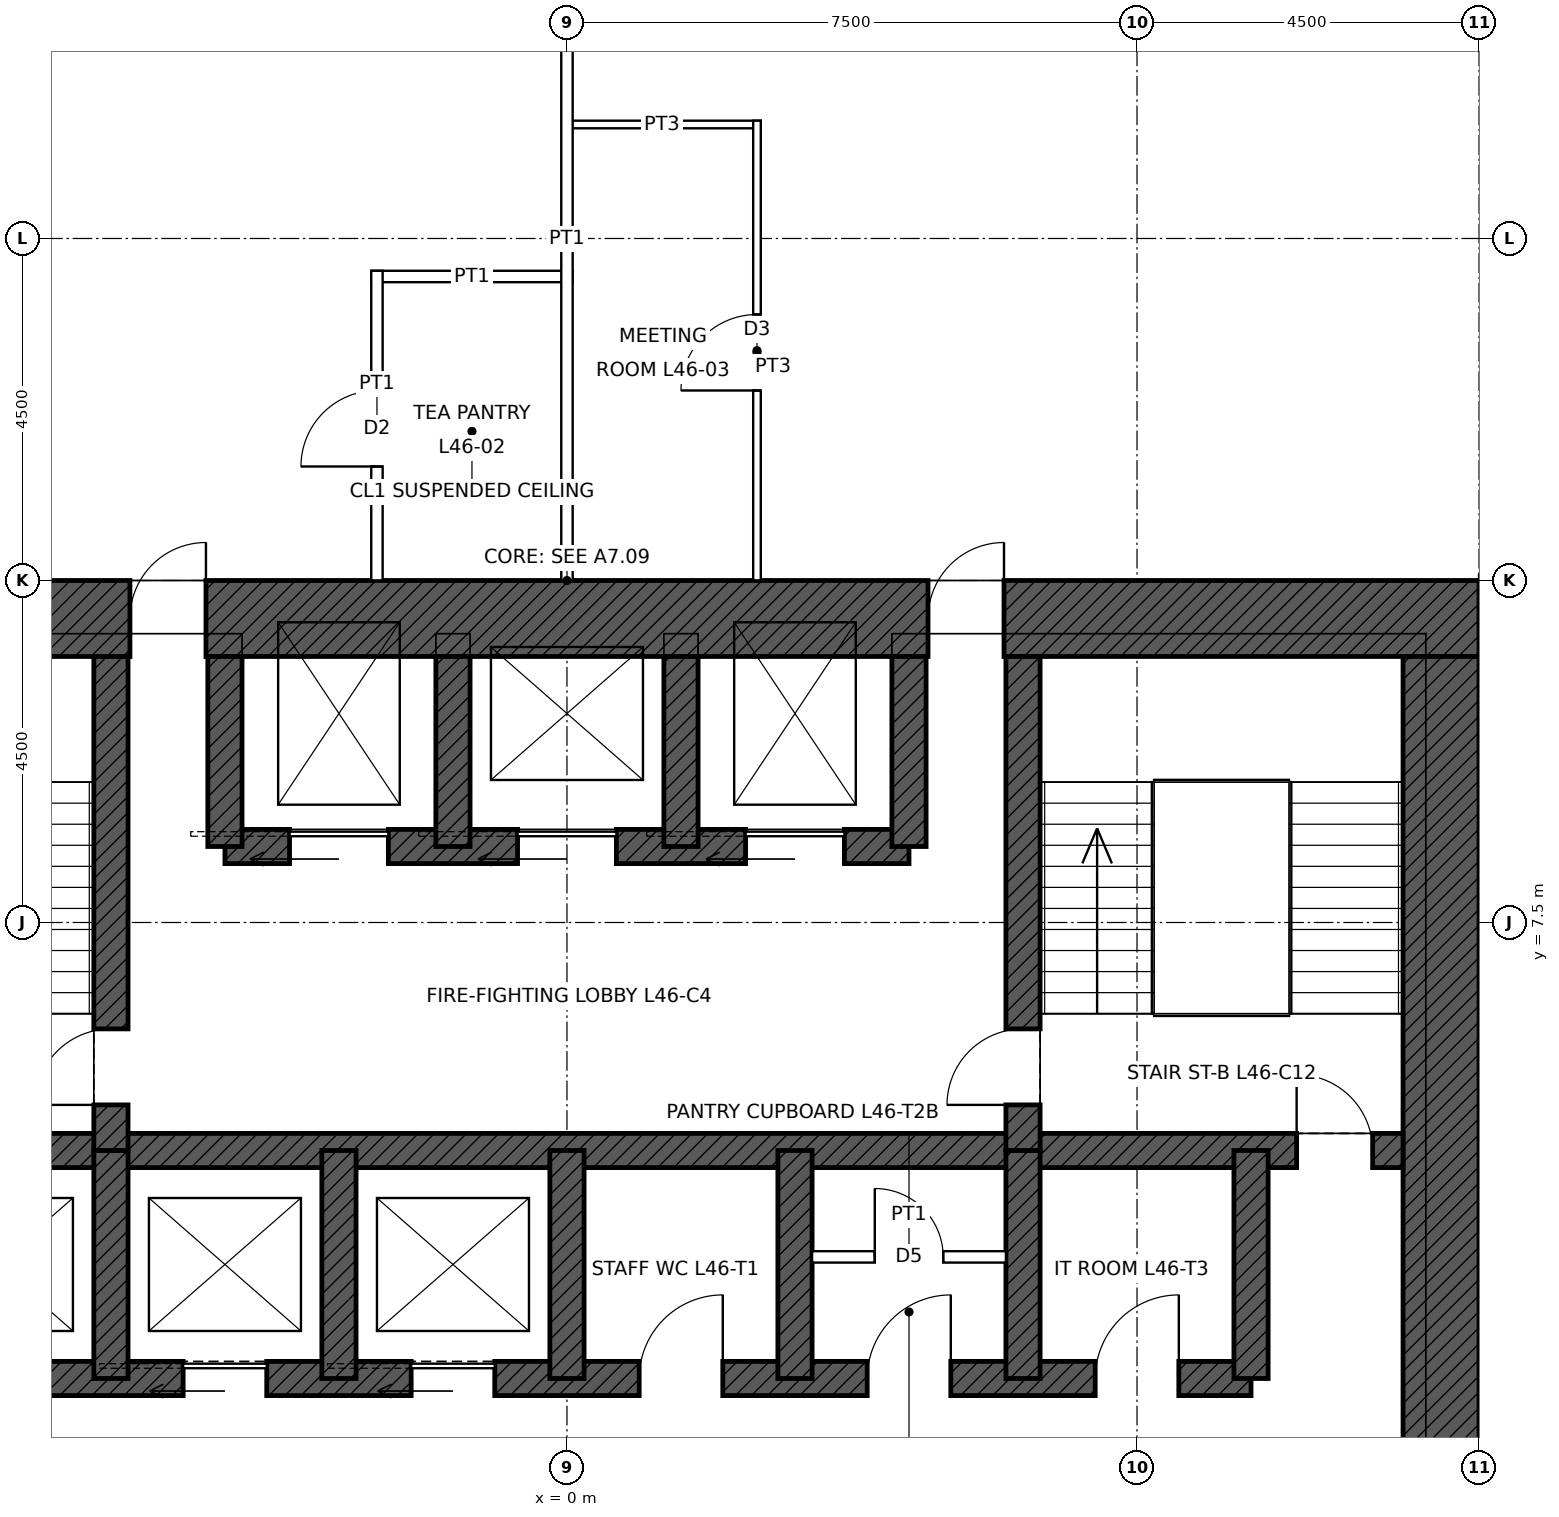
"""IFC4 building model, lengths in metres.
Left out: names, types, materials, properties, quantities, classifications, styles, units other than length and angle.
Written with IfcOpenShell. Run it as: python <this file> out.ifc"""

import sys

from ifc_helpers import new_model, si_unit, direction, frame, frame_2d, origin, place, context, subcontext, project, spatial, rectangle, extrude, element, fill, save


model = new_model("IFC4")
c1 = context("Model", 3, precision=1e-05, world=origin(), true_north=direction((0.0, 1.0)))
c2 = subcontext(c1, "Body", "Model", "MODEL_VIEW")
j1 = project(units=[si_unit("LENGTHUNIT", "METRE"), si_unit("PLANEANGLEUNIT", "RADIAN")], contexts=[c1])
p1 = place(None, origin())
s1 = spatial("IfcSite", under=j1, at=p1, CompositionType="ELEMENT")
p2 = place(p1, origin())
s2 = spatial("IfcBuilding", under=s1, at=p2, CompositionType="ELEMENT")
p3 = place(p2, frame((0.0, 0.0, 217.9)))
s3 = spatial("IfcBuildingStorey", under=s2, at=p3, CompositionType="ELEMENT", Elevation=217.9)
p4 = place(p3, frame((-12.0, 11.5, 0.0), z_axis=(0.0, 0.0, 1.0), x_axis=(1.0, 0.0, 0.0)))
e1 = element("IfcWall", 1, at=p4, inside=s3, PredefinedType="SHEAR", context=c2, shape_type="SweptSolid", body=[
    extrude(rectangle(XDim=24.0, YDim=1.0, at=frame_2d((12.0, 0.0))), origin(), (0.0, 0.0, 1.0), 4.0),
])
p5 = place(p4, frame((6.25, 0.0, 0.0)))
e2 = element("IfcOpeningElement", 2, at=p5, cuts=e1, PredefinedType="OPENING", context=c2, shape_type="SweptSolid", body=[
    extrude(rectangle(XDim=1.0, YDim=2.4, at=frame_2d((0.5, 1.2))), frame((0.0, 0.51, 0.0), z_axis=(0.0, -1.0, 0.0), x_axis=(1.0, 0.0, 0.0)), (0.0, 0.0, 1.0), 1.02),
])
p6 = place(p4, frame((16.75, 0.0, 0.0)))
e3 = element("IfcOpeningElement", 3, at=p6, cuts=e1, PredefinedType="OPENING", context=c2, shape_type="SweptSolid", body=[
    extrude(rectangle(XDim=1.0, YDim=2.4, at=frame_2d((0.5, 1.2))), frame((0.0, 0.51, 0.0), z_axis=(0.0, -1.0, 0.0), x_axis=(1.0, 0.0, 0.0)), (0.0, 0.0, 1.0), 1.02),
])
p7 = place(p3, frame((11.5, 11.0, 0.0), z_axis=(0.0, 0.0, 1.0), x_axis=(0.0, -1.0, 0.0)))
e4 = element("IfcWall", 4, at=p7, inside=s3, PredefinedType="SHEAR", context=c2, shape_type="SweptSolid", body=[
    extrude(rectangle(XDim=22.0, YDim=1.0, at=frame_2d((11.0, 0.0))), origin(), (0.0, 0.0, 1.0), 4.0),
])
p8 = place(p7, frame((10.5, 0.0, 0.0)))
e5 = element("IfcOpeningElement", 5, at=p8, cuts=e4, PredefinedType="OPENING", context=c2, shape_type="SweptSolid", body=[
    extrude(rectangle(XDim=1.0, YDim=2.4, at=frame_2d((0.5, 1.2))), frame((0.0, 0.51, 0.0), z_axis=(0.0, -1.0, 0.0), x_axis=(1.0, 0.0, 0.0)), (0.0, 0.0, 1.0), 1.02),
])
p9 = place(p3, frame((-11.0, 4.5, 0.0), z_axis=(0.0, 0.0, 1.0), x_axis=(1.0, 0.0, 0.0)))
e6 = element("IfcWall", 6, at=p9, inside=s3, PredefinedType="SHEAR", context=c2, shape_type="SweptSolid", body=[
    extrude(rectangle(XDim=22.0, YDim=0.45, at=frame_2d((11.0, 0.0))), origin(), (0.0, 0.0, 1.0), 4.0),
])
p10 = place(p9, frame((0.4, 0.0, 0.0)))
e7 = element("IfcOpeningElement", 7, at=p10, cuts=e6, PredefinedType="OPENING", context=c2, shape_type="SweptSolid", body=[
    extrude(rectangle(XDim=1.0, YDim=2.1, at=frame_2d((0.5, 1.05))), frame((0.0, 0.235, 0.0), z_axis=(0.0, -1.0, 0.0), x_axis=(1.0, 0.0, 0.0)), (0.0, 0.0, 1.0), 0.47),
])
p11 = place(p9, frame((20.6, 0.0, 0.0)))
e8 = element("IfcOpeningElement", 8, at=p11, cuts=e6, PredefinedType="OPENING", context=c2, shape_type="SweptSolid", body=[
    extrude(rectangle(XDim=1.0, YDim=2.1, at=frame_2d((0.5, 1.05))), frame((0.0, 0.235, 0.0), z_axis=(0.0, -1.0, 0.0), x_axis=(1.0, 0.0, 0.0)), (0.0, 0.0, 1.0), 0.47),
])
p12 = place(p3, frame((-9.0, 1.5, 0.0), z_axis=(0.0, 0.0, 1.0), x_axis=(1.0, 0.0, 0.0)))
e9 = element("IfcWall", 9, at=p12, inside=s3, PredefinedType="SHEAR", context=c2, shape_type="SweptSolid", body=[
    extrude(rectangle(XDim=18.0, YDim=0.45, at=frame_2d((9.0, 0.0))), origin(), (0.0, 0.0, 1.0), 4.0),
])
p13 = place(p12, frame((0.95, 0.0, 0.0)))
e10 = element("IfcOpeningElement", 10, at=p13, cuts=e9, PredefinedType="OPENING", context=c2, shape_type="SweptSolid", body=[
    extrude(rectangle(XDim=1.1, YDim=2.1, at=frame_2d((0.55, 1.05))), frame((0.0, 0.235, 0.0), z_axis=(0.0, -1.0, 0.0), x_axis=(1.0, 0.0, 0.0)), (0.0, 0.0, 1.0), 0.47),
])
p14 = place(p12, frame((3.95, 0.0, 0.0)))
e11 = element("IfcOpeningElement", 11, at=p14, cuts=e9, PredefinedType="OPENING", context=c2, shape_type="SweptSolid", body=[
    extrude(rectangle(XDim=1.1, YDim=2.1, at=frame_2d((0.55, 1.05))), frame((0.0, 0.235, 0.0), z_axis=(0.0, -1.0, 0.0), x_axis=(1.0, 0.0, 0.0)), (0.0, 0.0, 1.0), 0.47),
])
p15 = place(p12, frame((6.95, 0.0, 0.0)))
e12 = element("IfcOpeningElement", 12, at=p15, cuts=e9, PredefinedType="OPENING", context=c2, shape_type="SweptSolid", body=[
    extrude(rectangle(XDim=1.1, YDim=2.1, at=frame_2d((0.55, 1.05))), frame((0.0, 0.235, 0.0), z_axis=(0.0, -1.0, 0.0), x_axis=(1.0, 0.0, 0.0)), (0.0, 0.0, 1.0), 0.47),
])
p16 = place(p12, frame((9.95, 0.0, 0.0)))
e13 = element("IfcOpeningElement", 13, at=p16, cuts=e9, PredefinedType="OPENING", context=c2, shape_type="SweptSolid", body=[
    extrude(rectangle(XDim=1.1, YDim=2.1, at=frame_2d((0.55, 1.05))), frame((0.0, 0.235, 0.0), z_axis=(0.0, -1.0, 0.0), x_axis=(1.0, 0.0, 0.0)), (0.0, 0.0, 1.0), 0.47),
])
p17 = place(p12, frame((12.95, 0.0, 0.0)))
e14 = element("IfcOpeningElement", 14, at=p17, cuts=e9, PredefinedType="OPENING", context=c2, shape_type="SweptSolid", body=[
    extrude(rectangle(XDim=1.1, YDim=2.1, at=frame_2d((0.55, 1.05))), frame((0.0, 0.235, 0.0), z_axis=(0.0, -1.0, 0.0), x_axis=(1.0, 0.0, 0.0)), (0.0, 0.0, 1.0), 0.47),
])
p18 = place(p12, frame((15.95, 0.0, 0.0)))
e15 = element("IfcOpeningElement", 15, at=p18, cuts=e9, PredefinedType="OPENING", context=c2, shape_type="SweptSolid", body=[
    extrude(rectangle(XDim=1.1, YDim=2.1, at=frame_2d((0.55, 1.05))), frame((0.0, 0.235, 0.0), z_axis=(0.0, -1.0, 0.0), x_axis=(1.0, 0.0, 0.0)), (0.0, 0.0, 1.0), 0.47),
])
p19 = place(p3, frame((-4.5, 8.5, 0.0), z_axis=(0.0, 0.0, 1.0), x_axis=(1.0, 0.0, 0.0)))
e16 = element("IfcWall", 16, at=p19, inside=s3, PredefinedType="SHEAR", context=c2, shape_type="SweptSolid", body=[
    extrude(rectangle(XDim=9.0, YDim=0.45, at=frame_2d((4.5, 0.0))), origin(), (0.0, 0.0, 1.0), 4.0),
])
p20 = place(p19, frame((0.85, 0.0, 0.0)))
e17 = element("IfcOpeningElement", 17, at=p20, cuts=e16, PredefinedType="OPENING", context=c2, shape_type="SweptSolid", body=[
    extrude(rectangle(XDim=1.3, YDim=2.4, at=frame_2d((0.65, 1.2))), frame((0.0, 0.235, 0.0), z_axis=(0.0, -1.0, 0.0), x_axis=(1.0, 0.0, 0.0)), (0.0, 0.0, 1.0), 0.47),
])
p21 = place(p19, frame((6.85, 0.0, 0.0)))
e18 = element("IfcOpeningElement", 18, at=p21, cuts=e16, PredefinedType="OPENING", context=c2, shape_type="SweptSolid", body=[
    extrude(rectangle(XDim=1.3, YDim=2.4, at=frame_2d((0.65, 1.2))), frame((0.0, 0.235, 0.0), z_axis=(0.0, -1.0, 0.0), x_axis=(1.0, 0.0, 0.0)), (0.0, 0.0, 1.0), 0.47),
])
p22 = place(p19, frame((3.85, 0.0, 0.0)))
e19 = element("IfcOpeningElement", 19, at=p22, cuts=e16, PredefinedType="OPENING", context=c2, shape_type="SweptSolid", body=[
    extrude(rectangle(XDim=1.3, YDim=2.4, at=frame_2d((0.65, 1.2))), frame((0.0, 0.235, 0.0), z_axis=(0.0, -1.0, 0.0), x_axis=(1.0, 0.0, 0.0)), (0.0, 0.0, 1.0), 0.47),
])
for number, where, z_axis, x_axis in (
    (20, (9.0, 1.5, 0.0), (0.0, 0.0, 1.0), (0.0, 1.0, 0.0)),
    (21, (-6.0, 1.5, 0.0), (0.0, 0.0, 1.0), (0.0, 1.0, 0.0)),
    (22, (-3.0, 1.5, 0.0), (0.0, 0.0, 1.0), (0.0, 1.0, 0.0)),
    (23, (0.0, 1.5, 0.0), (0.0, 0.0, 1.0), (0.0, 1.0, 0.0)),
    (24, (3.0, 1.5, 0.0), (0.0, 0.0, 1.0), (0.0, 1.0, 0.0)),
    (25, (6.0, 1.5, 0.0), (0.0, 0.0, 1.0), (0.0, 1.0, 0.0)),
):
    element("IfcWall", number, at=place(p3, frame(where, z_axis=z_axis, x_axis=x_axis)), inside=s3, PredefinedType="SHEAR", context=c2, shape_type="SweptSolid", body=[
        extrude(rectangle(XDim=3.0, YDim=0.45, at=frame_2d((1.5, 0.0))), origin(), (0.0, 0.0, 1.0), 4.0),
    ])
p23 = place(p3, frame((-6.0, 4.5, 0.0), z_axis=(0.0, 0.0, 1.0), x_axis=(0.0, 1.0, 0.0)))
e26 = element("IfcWall", 26, at=p23, inside=s3, PredefinedType="SHEAR", context=c2, shape_type="SweptSolid", body=[
    extrude(rectangle(XDim=6.5, YDim=0.45, at=frame_2d((3.25, 0.0))), origin(), (0.0, 0.0, 1.0), 4.0),
])
p24 = place(p23, frame((0.6, 0.0, 0.0)))
e27 = element("IfcOpeningElement", 27, at=p24, cuts=e26, PredefinedType="OPENING", context=c2, shape_type="SweptSolid", body=[
    extrude(rectangle(XDim=1.0, YDim=2.1, at=frame_2d((0.5, 1.05))), frame((0.0, 0.235, 0.0), z_axis=(0.0, -1.0, 0.0), x_axis=(1.0, 0.0, 0.0)), (0.0, 0.0, 1.0), 0.47),
])
p25 = place(p3, frame((6.0, 4.5, 0.0), z_axis=(0.0, 0.0, 1.0), x_axis=(0.0, 1.0, 0.0)))
e28 = element("IfcWall", 28, at=p25, inside=s3, PredefinedType="SHEAR", context=c2, shape_type="SweptSolid", body=[
    extrude(rectangle(XDim=6.5, YDim=0.45, at=frame_2d((3.25, 0.0))), origin(), (0.0, 0.0, 1.0), 4.0),
])
p26 = place(p25, frame((0.6, 0.0, 0.0)))
e29 = element("IfcOpeningElement", 29, at=p26, cuts=e28, PredefinedType="OPENING", context=c2, shape_type="SweptSolid", body=[
    extrude(rectangle(XDim=1.0, YDim=2.1, at=frame_2d((0.5, 1.05))), frame((0.0, 0.235, 0.0), z_axis=(0.0, -1.0, 0.0), x_axis=(1.0, 0.0, 0.0)), (0.0, 0.0, 1.0), 0.47),
])
for number, where, z_axis, x_axis in (
    (30, (-4.5, 8.5, 0.0), (0.0, 0.0, 1.0), (0.0, 1.0, 0.0)),
    (31, (4.5, 8.5, 0.0), (0.0, 0.0, 1.0), (0.0, 1.0, 0.0)),
    (32, (-1.5, 8.5, 0.0), (0.0, 0.0, 1.0), (0.0, 1.0, 0.0)),
    (33, (1.5, 8.5, 0.0), (0.0, 0.0, 1.0), (0.0, 1.0, 0.0)),
):
    element("IfcWall", number, at=place(p3, frame(where, z_axis=z_axis, x_axis=x_axis)), inside=s3, PredefinedType="SHEAR", context=c2, shape_type="SweptSolid", body=[
        extrude(rectangle(XDim=2.5, YDim=0.45, at=frame_2d((1.25, 0.0))), origin(), (0.0, 0.0, 1.0), 4.0),
    ])
p27 = place(p3, frame((-2.575, 16.0, 0.0), z_axis=(0.0, 0.0, 1.0), x_axis=(1.0, 0.0, 0.0)))
e34 = element("IfcWall", 34, at=p27, inside=s3, PredefinedType="PARTITIONING", context=c2, shape_type="SweptSolid", body=[
    extrude(rectangle(XDim=2.65, YDim=0.15, at=frame_2d((1.325, 0.0))), origin(), (0.0, 0.0, 1.0), 3.85),
])
p28 = place(p3, frame((-0.05, 18.0, 0.0), z_axis=(0.0, 0.0, 1.0), x_axis=(1.0, 0.0, 0.0)))
e35 = element("IfcWall", 35, at=p28, inside=s3, PredefinedType="PARTITIONING", context=c2, shape_type="SweptSolid", body=[
    extrude(rectangle(XDim=2.6, YDim=0.1, at=frame_2d((1.3, 0.0))), origin(), (0.0, 0.0, 1.0), 3.85),
])
p29 = place(p3, frame((-2.5, 12.0, 0.0), z_axis=(0.0, 0.0, 1.0), x_axis=(0.0, 1.0, 0.0)))
e36 = element("IfcWall", 36, at=p29, inside=s3, PredefinedType="PARTITIONING", context=c2, shape_type="SweptSolid", body=[
    extrude(rectangle(XDim=4.075, YDim=0.15, at=frame_2d((2.038, 0.0))), origin(), (0.0, 0.0, 1.0), 3.85),
])
p30 = place(p29, frame((1.5, 0.0, 0.0)))
e37 = element("IfcOpeningElement", 37, at=p30, cuts=e36, PredefinedType="OPENING", context=c2, shape_type="SweptSolid", body=[
    extrude(rectangle(XDim=1.0, YDim=2.1, at=frame_2d((0.5, 1.05))), frame((0.0, 0.085, 0.0), z_axis=(0.0, -1.0, 0.0), x_axis=(1.0, 0.0, 0.0)), (0.0, 0.0, 1.0), 0.17),
])
p31 = place(p3, frame((0.0, 12.0, 0.0), z_axis=(0.0, 0.0, 1.0), x_axis=(0.0, 1.0, 0.0)))
e38 = element("IfcWall", 38, at=p31, inside=s3, PredefinedType="PARTITIONING", context=c2, shape_type="SweptSolid", body=[
    extrude(rectangle(XDim=8.99, YDim=0.15, at=frame_2d((4.495, 0.0))), origin(), (0.0, 0.0, 1.0), 3.238),
])
p32 = place(p3, frame((2.5, 12.0, 0.0), z_axis=(0.0, 0.0, 1.0), x_axis=(0.0, 1.0, 0.0)))
e39 = element("IfcWall", 39, at=p32, inside=s3, PredefinedType="PARTITIONING", context=c2, shape_type="SweptSolid", body=[
    extrude(rectangle(XDim=6.05, YDim=0.1, at=frame_2d((3.025, 0.0))), origin(), (0.0, 0.0, 1.0), 3.85),
])
p33 = place(p32, frame((2.5, 0.0, 0.0)))
e40 = element("IfcOpeningElement", 40, at=p33, cuts=e39, PredefinedType="OPENING", context=c2, shape_type="SweptSolid", body=[
    extrude(rectangle(XDim=1.0, YDim=2.1, at=frame_2d((0.5, 1.05))), frame((0.0, 0.06, 0.0), z_axis=(0.0, -1.0, 0.0), x_axis=(1.0, 0.0, 0.0)), (0.0, 0.0, 1.0), 0.12),
])
p34 = place(p3, frame((3.225, 3.1, 0.0), z_axis=(0.0, 0.0, 1.0), x_axis=(1.0, 0.0, 0.0)))
e41 = element("IfcWall", 41, at=p34, inside=s3, PredefinedType="PARTITIONING", context=c2, shape_type="SweptSolid", body=[
    extrude(rectangle(XDim=2.55, YDim=0.15, at=frame_2d((1.275, 0.0))), origin(), (0.0, 0.0, 1.0), 3.75),
])
p35 = place(p34, frame((0.825, 0.0, 0.0)))
e42 = element("IfcOpeningElement", 42, at=p35, cuts=e41, PredefinedType="OPENING", context=c2, shape_type="SweptSolid", body=[
    extrude(rectangle(XDim=0.9, YDim=2.1, at=frame_2d((0.45, 1.05))), frame((0.0, 0.085, 0.0), z_axis=(0.0, -1.0, 0.0), x_axis=(1.0, 0.0, 0.0)), (0.0, 0.0, 1.0), 0.17),
])
p36 = place(p11, origin())
e43 = element("IfcDoor", 43, at=p36, inside=s3, OperationType="SINGLE_SWING_LEFT", PredefinedType="DOOR", context=c2, shape_type="SweptSolid", body=[
    extrude(rectangle(XDim=1.0, YDim=2.1, at=frame_2d((0.5, 1.05))), frame((0.0, 0.025, 0.0), z_axis=(0.0, -1.0, 0.0), x_axis=(1.0, 0.0, 0.0)), (0.0, 0.0, 1.0), 0.05),
])
fill(e8, e43)
p37 = place(p24, origin())
e44 = element("IfcDoor", 44, at=p37, inside=s3, OperationType="SINGLE_SWING_LEFT", PredefinedType="DOOR", context=c2, shape_type="SweptSolid", body=[
    extrude(rectangle(XDim=1.0, YDim=2.1, at=frame_2d((0.5, 1.05))), frame((0.0, 0.025, 0.0), z_axis=(0.0, -1.0, 0.0), x_axis=(1.0, 0.0, 0.0)), (0.0, 0.0, 1.0), 0.05),
])
fill(e27, e44)
p38 = place(p26, origin())
e45 = element("IfcDoor", 45, at=p38, inside=s3, OperationType="SINGLE_SWING_LEFT", PredefinedType="DOOR", context=c2, shape_type="SweptSolid", body=[
    extrude(rectangle(XDim=1.0, YDim=2.1, at=frame_2d((0.5, 1.05))), frame((0.0, 0.025, 0.0), z_axis=(0.0, -1.0, 0.0), x_axis=(1.0, 0.0, 0.0)), (0.0, 0.0, 1.0), 0.05),
])
fill(e29, e45)
p39 = place(p5, origin())
e46 = element("IfcDoor", 46, at=p39, inside=s3, OperationType="SINGLE_SWING_RIGHT", PredefinedType="DOOR", context=c2, shape_type="SweptSolid", body=[
    extrude(rectangle(XDim=1.0, YDim=2.4, at=frame_2d((0.5, 1.2))), frame((0.0, 0.485, 0.0), z_axis=(0.0, -1.0, 0.0), x_axis=(1.0, 0.0, 0.0)), (0.0, 0.0, 1.0), 0.05),
])
fill(e2, e46)
p40 = place(p6, origin())
e47 = element("IfcDoor", 47, at=p40, inside=s3, OperationType="SINGLE_SWING_RIGHT", PredefinedType="DOOR", context=c2, shape_type="SweptSolid", body=[
    extrude(rectangle(XDim=1.0, YDim=2.4, at=frame_2d((0.5, 1.2))), frame((0.0, 0.485, 0.0), z_axis=(0.0, -1.0, 0.0), x_axis=(1.0, 0.0, 0.0)), (0.0, 0.0, 1.0), 0.05),
])
fill(e3, e47)
p41 = place(p20, origin())
e48 = element("IfcDoor", 48, at=p41, inside=s3, OperationType="SLIDING_TO_LEFT", PredefinedType="DOOR", context=c2, shape_type="SweptSolid", body=[
    extrude(rectangle(XDim=1.3, YDim=2.4, at=frame_2d((0.65, 1.2))), frame((0.0, 0.025, 0.0), z_axis=(0.0, -1.0, 0.0), x_axis=(1.0, 0.0, 0.0)), (0.0, 0.0, 1.0), 0.05),
])
fill(e17, e48)
p42 = place(p21, origin())
e49 = element("IfcDoor", 49, at=p42, inside=s3, OperationType="SLIDING_TO_LEFT", PredefinedType="DOOR", context=c2, shape_type="SweptSolid", body=[
    extrude(rectangle(XDim=1.3, YDim=2.4, at=frame_2d((0.65, 1.2))), frame((0.0, 0.025, 0.0), z_axis=(0.0, -1.0, 0.0), x_axis=(1.0, 0.0, 0.0)), (0.0, 0.0, 1.0), 0.05),
])
fill(e18, e49)
p43 = place(p22, origin())
e50 = element("IfcDoor", 50, at=p43, inside=s3, OperationType="SLIDING_TO_LEFT", PredefinedType="DOOR", context=c2, shape_type="SweptSolid", body=[
    extrude(rectangle(XDim=1.3, YDim=2.4, at=frame_2d((0.65, 1.2))), frame((0.0, 0.025, 0.0), z_axis=(0.0, -1.0, 0.0), x_axis=(1.0, 0.0, 0.0)), (0.0, 0.0, 1.0), 0.05),
])
fill(e19, e50)
p44 = place(p14, origin())
e51 = element("IfcDoor", 51, at=p44, inside=s3, OperationType="SLIDING_TO_LEFT", PredefinedType="DOOR", context=c2, shape_type="SweptSolid", body=[
    extrude(rectangle(XDim=1.1, YDim=2.1, at=frame_2d((0.55, 1.05))), frame((0.0, 0.025, 0.0), z_axis=(0.0, -1.0, 0.0), x_axis=(1.0, 0.0, 0.0)), (0.0, 0.0, 1.0), 0.05),
])
fill(e11, e51)
p45 = place(p15, origin())
e52 = element("IfcDoor", 52, at=p45, inside=s3, OperationType="SLIDING_TO_LEFT", PredefinedType="DOOR", context=c2, shape_type="SweptSolid", body=[
    extrude(rectangle(XDim=1.1, YDim=2.1, at=frame_2d((0.55, 1.05))), frame((0.0, 0.025, 0.0), z_axis=(0.0, -1.0, 0.0), x_axis=(1.0, 0.0, 0.0)), (0.0, 0.0, 1.0), 0.05),
])
fill(e12, e52)
p46 = place(p16, origin())
e53 = element("IfcDoor", 53, at=p46, inside=s3, OperationType="SINGLE_SWING_RIGHT", PredefinedType="DOOR", context=c2, shape_type="SweptSolid", body=[
    extrude(rectangle(XDim=1.1, YDim=2.1, at=frame_2d((0.55, 1.05))), frame((0.0, 0.025, 0.0), z_axis=(0.0, -1.0, 0.0), x_axis=(1.0, 0.0, 0.0)), (0.0, 0.0, 1.0), 0.05),
])
fill(e13, e53)
p47 = place(p17, origin())
e54 = element("IfcDoor", 54, at=p47, inside=s3, OperationType="SINGLE_SWING_RIGHT", PredefinedType="DOOR", context=c2, shape_type="SweptSolid", body=[
    extrude(rectangle(XDim=1.1, YDim=2.1, at=frame_2d((0.55, 1.05))), frame((0.0, 0.025, 0.0), z_axis=(0.0, -1.0, 0.0), x_axis=(1.0, 0.0, 0.0)), (0.0, 0.0, 1.0), 0.05),
])
fill(e14, e54)
p48 = place(p35, origin())
e55 = element("IfcDoor", 55, at=p48, inside=s3, OperationType="SINGLE_SWING_LEFT", PredefinedType="DOOR", context=c2, shape_type="SweptSolid", body=[
    extrude(rectangle(XDim=0.9, YDim=2.1, at=frame_2d((0.45, 1.05))), frame((0.0, 0.025, 0.0), z_axis=(0.0, -1.0, 0.0), x_axis=(1.0, 0.0, 0.0)), (0.0, 0.0, 1.0), 0.05),
])
fill(e42, e55)
p49 = place(p18, origin())
e56 = element("IfcDoor", 56, at=p49, inside=s3, OperationType="SINGLE_SWING_RIGHT", PredefinedType="DOOR", context=c2, shape_type="SweptSolid", body=[
    extrude(rectangle(XDim=1.1, YDim=2.1, at=frame_2d((0.55, 1.05))), frame((0.0, 0.025, 0.0), z_axis=(0.0, -1.0, 0.0), x_axis=(1.0, 0.0, 0.0)), (0.0, 0.0, 1.0), 0.05),
])
fill(e15, e56)
p50 = place(p30, origin())
e57 = element("IfcDoor", 57, at=p50, inside=s3, OperationType="SINGLE_SWING_LEFT", PredefinedType="DOOR", context=c2, shape_type="SweptSolid", body=[
    extrude(rectangle(XDim=1.0, YDim=2.1, at=frame_2d((0.5, 1.05))), frame((0.0, 0.025, 0.0), z_axis=(0.0, -1.0, 0.0), x_axis=(1.0, 0.0, 0.0)), (0.0, 0.0, 1.0), 0.05),
])
fill(e37, e57)
p51 = place(p33, origin())
e58 = element("IfcDoor", 58, at=p51, inside=s3, OperationType="SINGLE_SWING_LEFT", PredefinedType="DOOR", context=c2, shape_type="SweptSolid", body=[
    extrude(rectangle(XDim=1.0, YDim=2.1, at=frame_2d((0.5, 1.05))), frame((0.0, 0.025, 0.0), z_axis=(0.0, -1.0, 0.0), x_axis=(1.0, 0.0, 0.0)), (0.0, 0.0, 1.0), 0.05),
])
fill(e40, e58)
save(model, sys.argv[1])
